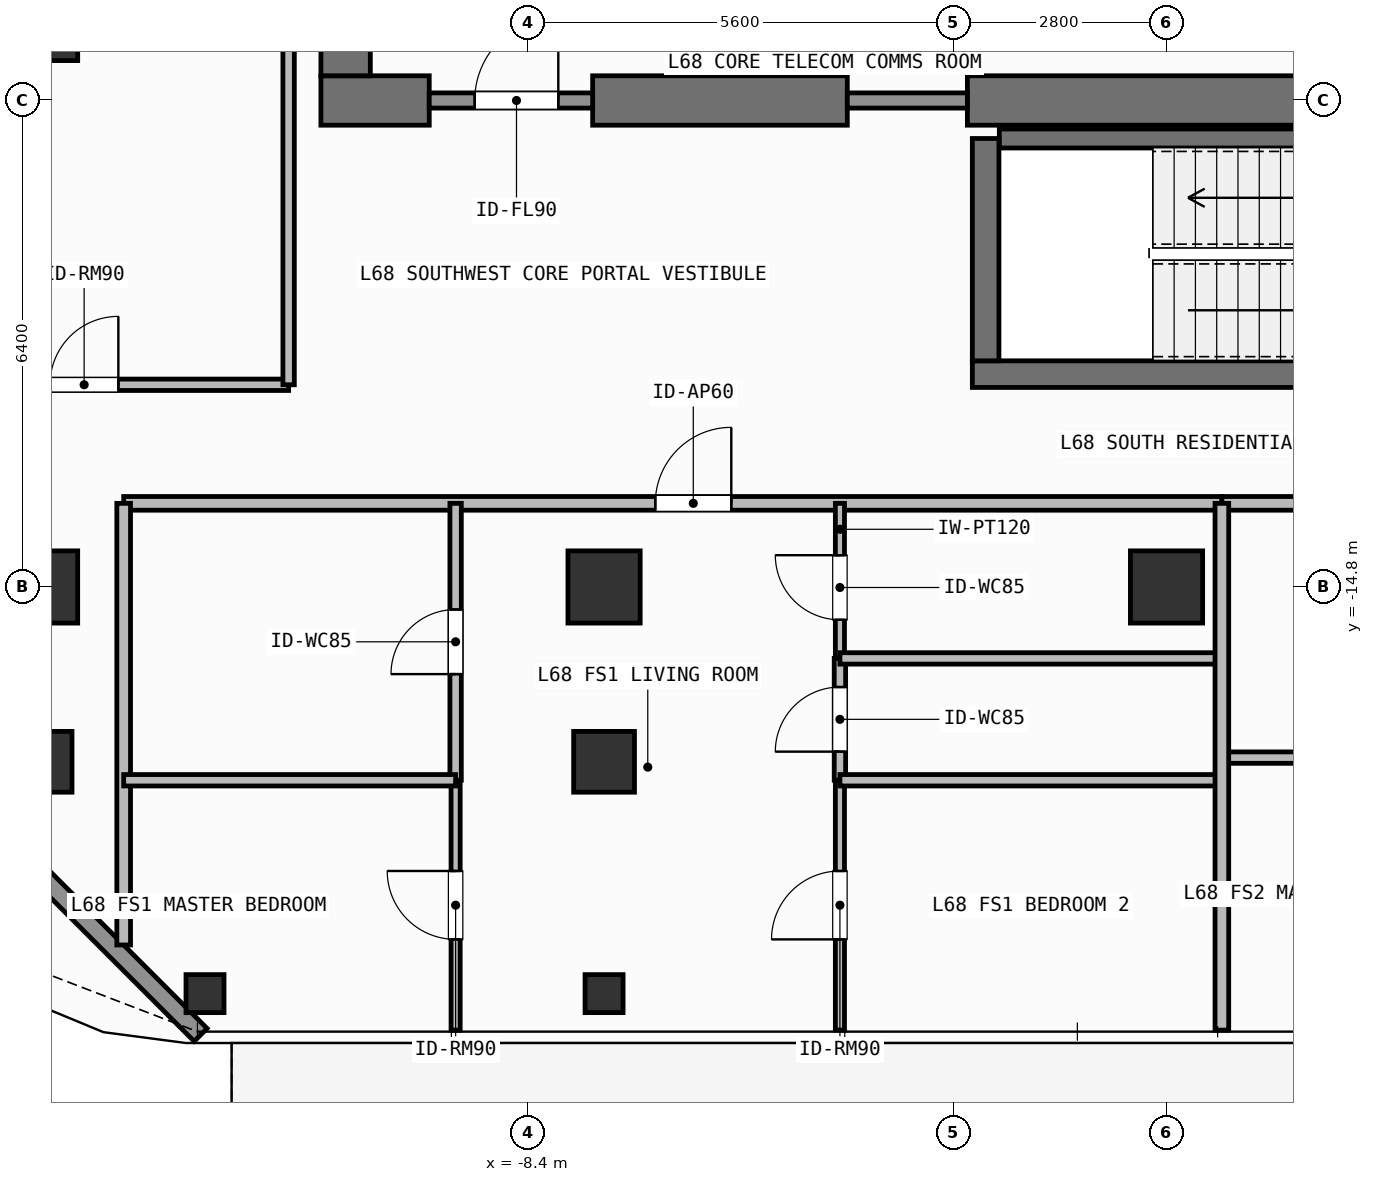
"""IFC4 building model, lengths in metres.
Left out: names, types, materials, properties, quantities, classifications, styles, units other than length and angle.
Written with IfcOpenShell. Run it as: python <this file> out.ifc"""

import sys

from ifc_helpers import new_model, si_unit, direction, frame, frame_2d, origin, origin_2d, place, context, subcontext, project, spatial, rectangle, hollow_rectangle, extrude, element, fill, save


model = new_model("IFC4")
c1 = context("Model", 3, precision=1e-05, world=origin(), true_north=direction((0.0, 1.0)))
c2 = subcontext(c1, "Body", "Model", "MODEL_VIEW")
j1 = project(units=[si_unit("LENGTHUNIT", "METRE"), si_unit("PLANEANGLEUNIT", "RADIAN")], contexts=[c1])
p1 = place(None, origin())
s1 = spatial("IfcSite", under=j1, at=p1, CompositionType="ELEMENT")
p2 = place(p1, origin())
s2 = spatial("IfcBuilding", under=s1, at=p2, CompositionType="ELEMENT")
p3 = place(p2, frame((0.0, 0.0, 278.1)))
s3 = spatial("IfcBuildingStorey", under=s2, at=p3, CompositionType="ELEMENT", Elevation=278.1)
p4 = place(p3, frame((-11.125, -8.4, 0.0), z_axis=(0.0, 0.0, 1.0), x_axis=(1.0, 0.0, 0.0)))
e1 = element("IfcWall", 1, at=p4, inside=s3, PredefinedType="SHEAR", context=c2, shape_type="SweptSolid", body=[
    extrude(rectangle(XDim=1.425, YDim=0.65, at=frame_2d((0.712, 0.0))), origin(), (0.0, 0.0, 1.0), 3.9),
])
p5 = place(p3, frame((-7.55, -8.4, 0.0), z_axis=(0.0, 0.0, 1.0), x_axis=(1.0, 0.0, 0.0)))
e2 = element("IfcWall", 2, at=p5, inside=s3, PredefinedType="SHEAR", context=c2, shape_type="SweptSolid", body=[
    extrude(rectangle(XDim=3.35, YDim=0.65, at=frame_2d((1.675, 0.0))), origin(), (0.0, 0.0, 1.0), 3.9),
])
p6 = place(p3, frame((-2.62, -8.4, 0.0), z_axis=(0.0, 0.0, 1.0), x_axis=(1.0, 0.0, 0.0)))
e3 = element("IfcWall", 3, at=p6, inside=s3, PredefinedType="SHEAR", context=c2, shape_type="SweptSolid", body=[
    extrude(rectangle(XDim=7.27, YDim=0.65, at=frame_2d((3.635, 0.0))), origin(), (0.0, 0.0, 1.0), 3.9),
])
p7 = place(p3, frame((-10.8, -8.075, 0.0), z_axis=(0.0, 0.0, 1.0), x_axis=(0.0, 1.0, 0.0)))
e4 = element("IfcWall", 4, at=p7, inside=s3, PredefinedType="SHEAR", context=c2, shape_type="SweptSolid", body=[
    extrude(rectangle(XDim=16.15, YDim=0.65, at=frame_2d((8.075, 0.0))), origin(), (0.0, 0.0, 1.0), 3.9),
])
p8 = place(p3, frame((-2.555, -12.0, 0.0), z_axis=(0.0, 0.0, 1.0), x_axis=(1.0, 0.0, 0.0)))
e5 = element("IfcWall", 5, at=p8, inside=s3, PredefinedType="SHEAR", context=c2, shape_type="SweptSolid", body=[
    extrude(rectangle(XDim=7.31, YDim=0.35, at=frame_2d((3.655, 0.0))), origin(), (0.0, 0.0, 1.0), 3.9),
])
p9 = place(p3, frame((-2.2, -8.9, 0.0), z_axis=(0.0, 0.0, 1.0), x_axis=(1.0, 0.0, 0.0)))
e6 = element("IfcWall", 6, at=p9, inside=s3, PredefinedType="SHEAR", context=c2, shape_type="SweptSolid", body=[
    extrude(rectangle(XDim=6.6, YDim=0.25, at=frame_2d((3.3, 0.0))), origin(), (0.0, 0.0, 1.0), 3.9),
])
p10 = place(p3, frame((-2.38, -11.825, 0.0), z_axis=(0.0, 0.0, 1.0), x_axis=(0.0, 1.0, 0.0)))
e7 = element("IfcWall", 7, at=p10, inside=s3, PredefinedType="SHEAR", context=c2, shape_type="SweptSolid", body=[
    extrude(rectangle(XDim=2.925, YDim=0.35, at=frame_2d((1.462, 0.0))), origin(), (0.0, 0.0, 1.0), 3.9),
])
for number, where, z_axis, x_axis in (
    (8, (-14.8, -14.8, 0.0), (0.0, 0.0, 1.0), (1.0, 0.0, 0.0)),
    (9, (-7.4, -14.8, 0.0), (0.0, 0.0, 1.0), (1.0, 0.0, 0.0)),
    (10, (0.0, -14.8, 0.0), (0.0, 0.0, 1.0), (1.0, 0.0, 0.0)),
    (11, (-14.8, -7.4, 0.0), (0.0, 0.0, 1.0), (1.0, 0.0, 0.0)),
):
    element("IfcColumn", number, at=place(p3, frame(where, z_axis=z_axis, x_axis=x_axis)), inside=s3, PredefinedType="COLUMN", context=c2, shape_type="SweptSolid", body=[
        extrude(rectangle(XDim=0.95, YDim=0.95, at=origin_2d()), origin(), (0.0, 0.0, 1.0), 3.9),
    ])
for number, where, z_axis, x_axis in (
    (12, (-14.8, -17.1, 0.0), (0.0, 0.0, 1.0), (1.0, 0.0, 0.0)),
    (13, (-7.4, -17.1, 0.0), (0.0, 0.0, 1.0), (1.0, 0.0, 0.0)),
):
    element("IfcColumn", number, at=place(p3, frame(where, z_axis=z_axis, x_axis=x_axis)), inside=s3, PredefinedType="COLUMN", context=c2, shape_type="SweptSolid", body=[
        extrude(hollow_rectangle(XDim=0.8, YDim=0.8, WallThickness=0.036, at=origin_2d()), origin(), (0.0, 0.0, 1.0), 3.9),
    ])
for number, where, z_axis, x_axis in (
    (14, (-12.65, -20.15, 0.0), (0.0, 0.0, 1.0), (1.0, 0.0, 0.0)),
    (15, (-7.4, -20.15, 0.0), (0.0, 0.0, 1.0), (1.0, 0.0, 0.0)),
):
    element("IfcColumn", number, at=place(p3, frame(where, z_axis=z_axis, x_axis=x_axis)), inside=s3, PredefinedType="COLUMN", context=c2, shape_type="SweptSolid", body=[
        extrude(hollow_rectangle(XDim=0.5, YDim=0.5, WallThickness=0.025, at=origin_2d()), origin(), (0.0, 0.0, 1.0), 3.9),
    ])
p11 = place(p3, frame((-12.708, -20.692, 0.0), z_axis=(0.0, 0.0, 1.0), x_axis=(-0.707126925818, 0.707086635981, 0.0)))
e16 = element("IfcWall", 16, at=p11, inside=s3, PredefinedType="SOLIDWALL", context=c2, shape_type="SweptSolid", body=[
    extrude(rectangle(XDim=6.06, YDim=0.24, at=frame_2d((3.03, 0.0))), origin(), (0.0, 0.0, 1.0), 3.68),
])
p12 = place(p3, frame((-9.7, -8.4, 0.0), z_axis=(0.0, 0.0, 1.0), x_axis=(1.0, 0.0, 0.0)))
e17 = element("IfcWall", 17, at=p12, inside=s3, PredefinedType="SOLIDWALL", context=c2, shape_type="SweptSolid", body=[
    extrude(rectangle(XDim=2.15, YDim=0.2, at=frame_2d((1.075, 0.0))), origin(), (0.0, 0.0, 1.0), 2.92),
])
p13 = place(p12, frame((0.598, 0.0, 0.0)))
e18 = element("IfcOpeningElement", 18, at=p13, cuts=e17, PredefinedType="OPENING", context=c2, shape_type="SweptSolid", body=[
    extrude(rectangle(XDim=1.1, YDim=2.15, at=frame_2d((0.55, 1.075))), frame((0.0, 0.11, 0.0), z_axis=(0.0, -1.0, 0.0), x_axis=(1.0, 0.0, 0.0)), (0.0, 0.0, 1.0), 0.22),
])
p14 = place(p3, frame((-13.72, -13.7, 0.0), z_axis=(0.0, 0.0, 1.0), x_axis=(1.0, 0.0, 0.0)))
e19 = element("IfcWall", 19, at=p14, inside=s3, PredefinedType="PARTITIONING", context=c2, shape_type="SweptSolid", body=[
    extrude(rectangle(XDim=14.448, YDim=0.18, at=frame_2d((7.224, 0.0))), origin(), (0.0, 0.0, 1.0), 3.68),
])
p15 = place(p14, frame((6.994, 0.0, 0.0)))
e20 = element("IfcOpeningElement", 20, at=p15, cuts=e19, PredefinedType="OPENING", context=c2, shape_type="SweptSolid", body=[
    extrude(rectangle(XDim=1.0, YDim=2.2, at=frame_2d((0.5, 1.1))), frame((0.0, 0.1, 0.0), z_axis=(0.0, -1.0, 0.0), x_axis=(1.0, 0.0, 0.0)), (0.0, 0.0, 1.0), 0.2),
])
p16 = place(p3, frame((-9.353, -17.343, 0.0), z_axis=(0.0, 0.0, 1.0), x_axis=(0.0, 1.0, 0.0)))
e21 = element("IfcWall", 21, at=p16, inside=s3, PredefinedType="PARTITIONING", context=c2, shape_type="SweptSolid", body=[
    extrude(rectangle(XDim=3.643, YDim=0.15, at=frame_2d((1.822, 0.0))), origin(), (0.0, 0.0, 1.0), 3.68),
])
p17 = place(p16, frame((1.396, 0.0, 0.0)))
e22 = element("IfcOpeningElement", 22, at=p17, cuts=e21, PredefinedType="OPENING", context=c2, shape_type="SweptSolid", body=[
    extrude(rectangle(XDim=0.85, YDim=2.1, at=frame_2d((0.425, 1.05))), frame((0.0, 0.085, 0.0), z_axis=(0.0, -1.0, 0.0), x_axis=(1.0, 0.0, 0.0)), (0.0, 0.0, 1.0), 0.17),
])
p18 = place(p3, frame((-9.353, -20.63, 0.0), z_axis=(0.0, 0.0, 1.0), x_axis=(0.0, 1.0, 0.0)))
e23 = element("IfcWall", 23, at=p18, inside=s3, PredefinedType="PARTITIONING", context=c2, shape_type="SweptSolid", body=[
    extrude(rectangle(XDim=3.287, YDim=0.12, at=frame_2d((1.644, 0.0))), origin(), (0.0, 0.0, 1.0), 3.68),
])
p19 = place(p18, frame((1.194, 0.0, 0.0)))
e24 = element("IfcOpeningElement", 24, at=p19, cuts=e23, PredefinedType="OPENING", context=c2, shape_type="SweptSolid", body=[
    extrude(rectangle(XDim=0.9, YDim=2.1, at=frame_2d((0.45, 1.05))), frame((0.0, 0.07, 0.0), z_axis=(0.0, -1.0, 0.0), x_axis=(1.0, 0.0, 0.0)), (0.0, 0.0, 1.0), 0.14),
])
p20 = place(p3, frame((-4.297, -17.343, 0.0), z_axis=(0.0, 0.0, 1.0), x_axis=(0.0, 1.0, 0.0)))
e25 = element("IfcWall", 25, at=p20, inside=s3, PredefinedType="PARTITIONING", context=c2, shape_type="SweptSolid", body=[
    extrude(rectangle(XDim=1.603, YDim=0.15, at=frame_2d((0.802, 0.0))), origin(), (0.0, 0.0, 1.0), 3.68),
])
p21 = place(p20, frame((0.376, 0.0, 0.0)))
e26 = element("IfcOpeningElement", 26, at=p21, cuts=e25, PredefinedType="OPENING", context=c2, shape_type="SweptSolid", body=[
    extrude(rectangle(XDim=0.85, YDim=2.1, at=frame_2d((0.425, 1.05))), frame((0.0, 0.085, 0.0), z_axis=(0.0, -1.0, 0.0), x_axis=(1.0, 0.0, 0.0)), (0.0, 0.0, 1.0), 0.17),
])
p22 = place(p3, frame((-4.297, -15.74, 0.0), z_axis=(0.0, 0.0, 1.0), x_axis=(0.0, 1.0, 0.0)))
e27 = element("IfcWall", 27, at=p22, inside=s3, PredefinedType="PARTITIONING", context=c2, shape_type="SweptSolid", body=[
    extrude(rectangle(XDim=2.04, YDim=0.12, at=frame_2d((1.02, 0.0))), origin(), (0.0, 0.0, 1.0), 3.68),
])
p23 = place(p22, frame((0.508, 0.0, 0.0)))
e28 = element("IfcOpeningElement", 28, at=p23, cuts=e27, PredefinedType="OPENING", context=c2, shape_type="SweptSolid", body=[
    extrude(rectangle(XDim=0.85, YDim=2.1, at=frame_2d((0.425, 1.05))), frame((0.0, 0.07, 0.0), z_axis=(0.0, -1.0, 0.0), x_axis=(1.0, 0.0, 0.0)), (0.0, 0.0, 1.0), 0.14),
])
p24 = place(p3, frame((-4.297, -20.63, 0.0), z_axis=(0.0, 0.0, 1.0), x_axis=(0.0, 1.0, 0.0)))
e29 = element("IfcWall", 29, at=p24, inside=s3, PredefinedType="PARTITIONING", context=c2, shape_type="SweptSolid", body=[
    extrude(rectangle(XDim=3.287, YDim=0.12, at=frame_2d((1.644, 0.0))), origin(), (0.0, 0.0, 1.0), 3.68),
])
p25 = place(p24, frame((1.194, 0.0, 0.0)))
e30 = element("IfcOpeningElement", 30, at=p25, cuts=e29, PredefinedType="OPENING", context=c2, shape_type="SweptSolid", body=[
    extrude(rectangle(XDim=0.9, YDim=2.1, at=frame_2d((0.45, 1.05))), frame((0.0, 0.07, 0.0), z_axis=(0.0, -1.0, 0.0), x_axis=(1.0, 0.0, 0.0)), (0.0, 0.0, 1.0), 0.14),
])
p26 = place(p3, frame((0.728, -13.7, 0.0), z_axis=(0.0, 0.0, 1.0), x_axis=(1.0, 0.0, 0.0)))
e31 = element("IfcWall", 31, at=p26, inside=s3, PredefinedType="PARTITIONING", context=c2, shape_type="SweptSolid", body=[
    extrude(rectangle(XDim=20.792, YDim=0.18, at=frame_2d((10.396, 0.0))), origin(), (0.0, 0.0, 1.0), 3.68),
])
p27 = place(p26, frame((9.807, 0.0, 0.0)))
e32 = element("IfcOpeningElement", 32, at=p27, cuts=e31, PredefinedType="OPENING", context=c2, shape_type="SweptSolid", body=[
    extrude(rectangle(XDim=1.0, YDim=2.2, at=frame_2d((0.5, 1.1))), frame((0.0, 0.1, 0.0), z_axis=(0.0, -1.0, 0.0), x_axis=(1.0, 0.0, 0.0)), (0.0, 0.0, 1.0), 0.2),
])
p28 = place(p3, frame((-16.93, -12.14, 0.0), z_axis=(0.0, 0.0, 1.0), x_axis=(1.0, 0.0, 0.0)))
e33 = element("IfcWall", 33, at=p28, inside=s3, PredefinedType="PARTITIONING", context=c2, shape_type="SweptSolid", body=[
    extrude(rectangle(XDim=5.38, YDim=0.15, at=frame_2d((2.69, 0.0))), origin(), (0.0, 0.0, 1.0), 3.68),
])
p29 = place(p28, frame((2.24, 0.0, 0.0)))
e34 = element("IfcOpeningElement", 34, at=p29, cuts=e33, PredefinedType="OPENING", context=c2, shape_type="SweptSolid", body=[
    extrude(rectangle(XDim=0.9, YDim=2.1, at=frame_2d((0.45, 1.05))), frame((0.0, 0.085, 0.0), z_axis=(0.0, -1.0, 0.0), x_axis=(1.0, 0.0, 0.0)), (0.0, 0.0, 1.0), 0.17),
])
p30 = place(p3, frame((-4.2, -8.4, 0.0), z_axis=(0.0, 0.0, 1.0), x_axis=(1.0, 0.0, 0.0)))
e35 = element("IfcWall", 35, at=p30, inside=s3, PredefinedType="SOLIDWALL", context=c2, shape_type="SweptSolid", body=[
    extrude(rectangle(XDim=1.58, YDim=0.2, at=frame_2d((0.79, 0.0))), origin(), (0.0, 0.0, 1.0), 2.92),
])
p31 = place(p3, frame((-13.72, -19.51, 0.0), z_axis=(0.0, 0.0, 1.0), x_axis=(0.0, 1.0, 0.0)))
e36 = element("IfcWall", 36, at=p31, inside=s3, PredefinedType="PARTITIONING", context=c2, shape_type="SweptSolid", body=[
    extrude(rectangle(XDim=5.81, YDim=0.18, at=frame_2d((2.905, 0.0))), origin(), (0.0, 0.0, 1.0), 3.68),
])
p32 = place(p3, frame((-13.72, -17.343, 0.0), z_axis=(0.0, 0.0, 1.0), x_axis=(1.0, 0.0, 0.0)))
e37 = element("IfcWall", 37, at=p32, inside=s3, PredefinedType="PARTITIONING", context=c2, shape_type="SweptSolid", body=[
    extrude(rectangle(XDim=4.367, YDim=0.15, at=frame_2d((2.184, 0.0))), origin(), (0.0, 0.0, 1.0), 3.182),
])
p33 = place(p3, frame((-4.297, -15.74, 0.0), z_axis=(0.0, 0.0, 1.0), x_axis=(1.0, 0.0, 0.0)))
e38 = element("IfcWall", 38, at=p33, inside=s3, PredefinedType="PARTITIONING", context=c2, shape_type="SweptSolid", body=[
    extrude(rectangle(XDim=5.025, YDim=0.15, at=frame_2d((2.513, 0.0))), origin(), (0.0, 0.0, 1.0), 3.68),
])
p34 = place(p3, frame((-4.297, -17.343, 0.0), z_axis=(0.0, 0.0, 1.0), x_axis=(1.0, 0.0, 0.0)))
e39 = element("IfcWall", 39, at=p34, inside=s3, PredefinedType="PARTITIONING", context=c2, shape_type="SweptSolid", body=[
    extrude(rectangle(XDim=5.025, YDim=0.15, at=frame_2d((2.513, 0.0))), origin(), (0.0, 0.0, 1.0), 3.182),
])
p35 = place(p3, frame((0.728, -17.045, 0.0), z_axis=(0.0, 0.0, 1.0), x_axis=(1.0, 0.0, 0.0)))
e40 = element("IfcWall", 40, at=p35, inside=s3, PredefinedType="PARTITIONING", context=c2, shape_type="SweptSolid", body=[
    extrude(rectangle(XDim=4.752, YDim=0.15, at=frame_2d((2.376, 0.0))), origin(), (0.0, 0.0, 1.0), 3.182),
])
p36 = place(p3, frame((0.728, -20.63, 0.0), z_axis=(0.0, 0.0, 1.0), x_axis=(0.0, 1.0, 0.0)))
e41 = element("IfcWall", 41, at=p36, inside=s3, PredefinedType="PARTITIONING", context=c2, shape_type="SweptSolid", body=[
    extrude(rectangle(XDim=6.93, YDim=0.18, at=frame_2d((3.465, 0.0))), origin(), (0.0, 0.0, 1.0), 3.68),
])
p37 = place(p3, frame((-11.55, -12.14, 0.0), z_axis=(0.0, 0.0, 1.0), x_axis=(0.0, 1.0, 0.0)))
e42 = element("IfcWall", 42, at=p37, inside=s3, PredefinedType="PARTITIONING", context=c2, shape_type="SweptSolid", body=[
    extrude(rectangle(XDim=13.94, YDim=0.15, at=frame_2d((6.97, 0.0))), origin(), (0.0, 0.0, 1.0), 3.68),
])
p38 = place(p13, origin())
e43 = element("IfcDoor", 43, at=p38, inside=s3, OperationType="SINGLE_SWING_RIGHT", PredefinedType="DOOR", context=c2, shape_type="SweptSolid", body=[
    extrude(rectangle(XDim=1.1, YDim=2.15, at=frame_2d((0.55, 1.075))), frame((0.0, 0.025, 0.0), z_axis=(0.0, -1.0, 0.0), x_axis=(1.0, 0.0, 0.0)), (0.0, 0.0, 1.0), 0.05),
])
fill(e18, e43)
p39 = place(p15, origin())
e44 = element("IfcDoor", 44, at=p39, inside=s3, OperationType="SINGLE_SWING_RIGHT", PredefinedType="DOOR", context=c2, shape_type="SweptSolid", body=[
    extrude(rectangle(XDim=1.0, YDim=2.2, at=frame_2d((0.5, 1.1))), frame((0.0, 0.025, 0.0), z_axis=(0.0, -1.0, 0.0), x_axis=(1.0, 0.0, 0.0)), (0.0, 0.0, 1.0), 0.05),
])
fill(e20, e44)
p40 = place(p17, origin())
e45 = element("IfcDoor", 45, at=p40, inside=s3, OperationType="SINGLE_SWING_LEFT", PredefinedType="DOOR", context=c2, shape_type="SweptSolid", body=[
    extrude(rectangle(XDim=0.85, YDim=2.1, at=frame_2d((0.425, 1.05))), frame((0.0, 0.025, 0.0), z_axis=(0.0, -1.0, 0.0), x_axis=(1.0, 0.0, 0.0)), (0.0, 0.0, 1.0), 0.05),
])
fill(e22, e45)
p41 = place(p19, origin())
e46 = element("IfcDoor", 46, at=p41, inside=s3, OperationType="SINGLE_SWING_RIGHT", PredefinedType="DOOR", context=c2, shape_type="SweptSolid", body=[
    extrude(rectangle(XDim=0.9, YDim=2.1, at=frame_2d((0.45, 1.05))), frame((0.0, 0.025, 0.0), z_axis=(0.0, -1.0, 0.0), x_axis=(1.0, 0.0, 0.0)), (0.0, 0.0, 1.0), 0.05),
])
fill(e24, e46)
p42 = place(p21, origin())
e47 = element("IfcDoor", 47, at=p42, inside=s3, OperationType="SINGLE_SWING_LEFT", PredefinedType="DOOR", context=c2, shape_type="SweptSolid", body=[
    extrude(rectangle(XDim=0.85, YDim=2.1, at=frame_2d((0.425, 1.05))), frame((0.0, 0.025, 0.0), z_axis=(0.0, -1.0, 0.0), x_axis=(1.0, 0.0, 0.0)), (0.0, 0.0, 1.0), 0.05),
])
fill(e26, e47)
p43 = place(p23, origin())
e48 = element("IfcDoor", 48, at=p43, inside=s3, OperationType="SINGLE_SWING_RIGHT", PredefinedType="DOOR", context=c2, shape_type="SweptSolid", body=[
    extrude(rectangle(XDim=0.85, YDim=2.1, at=frame_2d((0.425, 1.05))), frame((0.0, 0.025, 0.0), z_axis=(0.0, -1.0, 0.0), x_axis=(1.0, 0.0, 0.0)), (0.0, 0.0, 1.0), 0.05),
])
fill(e28, e48)
p44 = place(p25, origin())
e49 = element("IfcDoor", 49, at=p44, inside=s3, OperationType="SINGLE_SWING_LEFT", PredefinedType="DOOR", context=c2, shape_type="SweptSolid", body=[
    extrude(rectangle(XDim=0.9, YDim=2.1, at=frame_2d((0.45, 1.05))), frame((0.0, 0.025, 0.0), z_axis=(0.0, -1.0, 0.0), x_axis=(1.0, 0.0, 0.0)), (0.0, 0.0, 1.0), 0.05),
])
fill(e30, e49)
p45 = place(p29, origin())
e50 = element("IfcDoor", 50, at=p45, inside=s3, OperationType="SINGLE_SWING_RIGHT", PredefinedType="DOOR", context=c2, shape_type="SweptSolid", body=[
    extrude(rectangle(XDim=0.9, YDim=2.1, at=frame_2d((0.45, 1.05))), frame((0.0, 0.025, 0.0), z_axis=(0.0, -1.0, 0.0), x_axis=(1.0, 0.0, 0.0)), (0.0, 0.0, 1.0), 0.05),
])
fill(e34, e50)
save(model, sys.argv[1])
